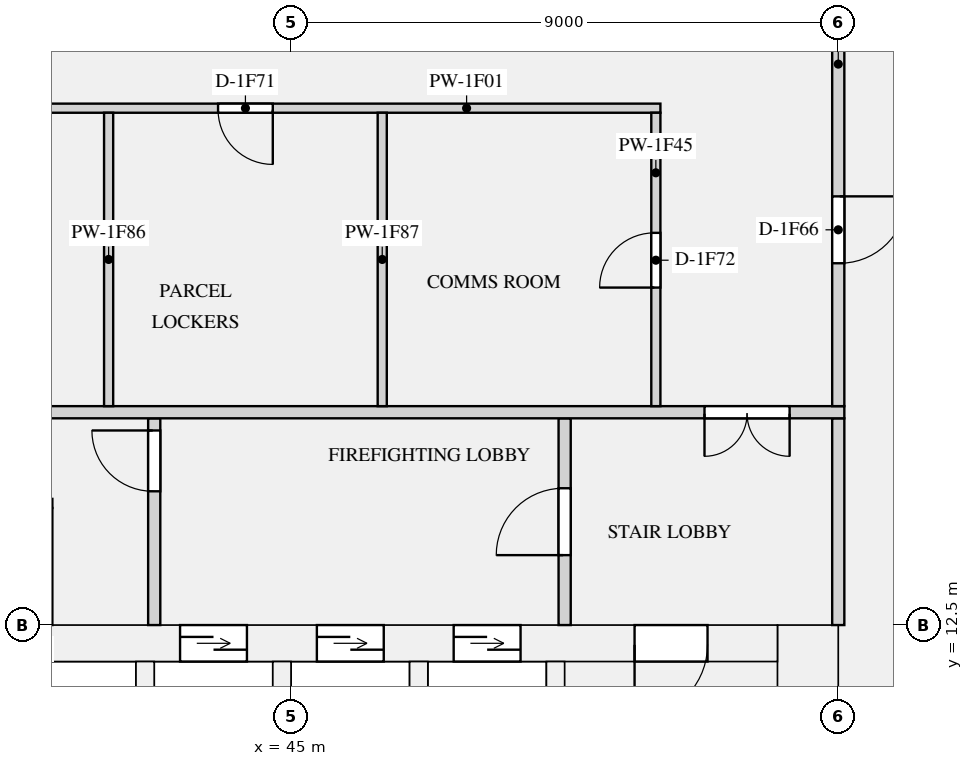
"""IFC4 building model, lengths in metres.
Left out: names, types, materials, properties, quantities, classifications, styles, units other than length and angle.
Written with IfcOpenShell. Run it as: python <this file> out.ifc"""

import sys

from ifc_helpers import new_model, si_unit, direction, frame, frame_2d, origin, place, context, subcontext, project, spatial, rectangle, extrude, element, fill, save


model = new_model("IFC4")
c1 = context("Model", 3, precision=1e-05, world=origin(), true_north=direction((0.0, 1.0)))
c2 = subcontext(c1, "Body", "Model", "MODEL_VIEW")
j1 = project(units=[si_unit("LENGTHUNIT", "METRE"), si_unit("PLANEANGLEUNIT", "RADIAN")], contexts=[c1])
p1 = place(None, origin())
s1 = spatial("IfcSite", under=j1, at=p1, CompositionType="ELEMENT")
p2 = place(p1, origin())
s2 = spatial("IfcBuilding", under=s1, at=p2, CompositionType="ELEMENT")
p3 = place(p2, frame((0.0, 0.0, 60.45)))
s3 = spatial("IfcBuildingStorey", under=s2, at=p3, CompositionType="ELEMENT", Elevation=60.45)
p4 = place(p3, frame((53.5, 0.0, 0.0), z_axis=(0.0, 0.0, 1.0), x_axis=(0.0, 1.0, 0.0)))
e1 = element("IfcWall", 1, at=p4, inside=s3, PredefinedType="SHEAR", context=c2, shape_type="SweptSolid", body=[
    extrude(rectangle(XDim=12.5, YDim=1.0, at=frame_2d((6.25, 0.0))), origin(), (0.0, 0.0, 1.0), 3.15),
])
p5 = place(p3, frame((19.0, 12.2, 0.0), z_axis=(0.0, 0.0, 1.0), x_axis=(1.0, 0.0, 0.0)))
e2 = element("IfcWall", 2, at=p5, inside=s3, PredefinedType="SHEAR", context=c2, shape_type="SweptSolid", body=[
    extrude(rectangle(XDim=34.0, YDim=0.6, at=frame_2d((17.0, 0.0))), origin(), (0.0, 0.0, 1.0), 3.15),
])
p6 = place(p5, frame((4.475, 0.0, 0.0)))
e3 = element("IfcOpeningElement", 3, at=p6, cuts=e2, PredefinedType="OPENING", context=c2, shape_type="SweptSolid", body=[
    extrude(rectangle(XDim=1.2, YDim=2.1, at=frame_2d((0.6, 1.05))), frame((0.0, 0.31, 0.0), z_axis=(0.0, -1.0, 0.0), x_axis=(1.0, 0.0, 0.0)), (0.0, 0.0, 1.0), 0.62),
])
p7 = place(p5, frame((7.325, 0.0, 0.0)))
e4 = element("IfcOpeningElement", 4, at=p7, cuts=e2, PredefinedType="OPENING", context=c2, shape_type="SweptSolid", body=[
    extrude(rectangle(XDim=1.2, YDim=2.1, at=frame_2d((0.6, 1.05))), frame((0.0, 0.31, 0.0), z_axis=(0.0, -1.0, 0.0), x_axis=(1.0, 0.0, 0.0)), (0.0, 0.0, 1.0), 0.62),
])
p8 = place(p5, frame((10.175, 0.0, 0.0)))
e5 = element("IfcOpeningElement", 5, at=p8, cuts=e2, PredefinedType="OPENING", context=c2, shape_type="SweptSolid", body=[
    extrude(rectangle(XDim=1.2, YDim=2.1, at=frame_2d((0.6, 1.05))), frame((0.0, 0.31, 0.0), z_axis=(0.0, -1.0, 0.0), x_axis=(1.0, 0.0, 0.0)), (0.0, 0.0, 1.0), 0.62),
])
p9 = place(p5, frame((13.025, 0.0, 0.0)))
e6 = element("IfcOpeningElement", 6, at=p9, cuts=e2, PredefinedType="OPENING", context=c2, shape_type="SweptSolid", body=[
    extrude(rectangle(XDim=1.2, YDim=2.1, at=frame_2d((0.6, 1.05))), frame((0.0, 0.31, 0.0), z_axis=(0.0, -1.0, 0.0), x_axis=(1.0, 0.0, 0.0)), (0.0, 0.0, 1.0), 0.62),
])
p10 = place(p5, frame((15.875, 0.0, 0.0)))
e7 = element("IfcOpeningElement", 7, at=p10, cuts=e2, PredefinedType="OPENING", context=c2, shape_type="SweptSolid", body=[
    extrude(rectangle(XDim=1.2, YDim=2.1, at=frame_2d((0.6, 1.05))), frame((0.0, 0.31, 0.0), z_axis=(0.0, -1.0, 0.0), x_axis=(1.0, 0.0, 0.0)), (0.0, 0.0, 1.0), 0.62),
])
p11 = place(p5, frame((24.175, 0.0, 0.0)))
e8 = element("IfcOpeningElement", 8, at=p11, cuts=e2, PredefinedType="OPENING", context=c2, shape_type="SweptSolid", body=[
    extrude(rectangle(XDim=1.1, YDim=2.1, at=frame_2d((0.55, 1.05))), frame((0.0, 0.31, 0.0), z_axis=(0.0, -1.0, 0.0), x_axis=(1.0, 0.0, 0.0)), (0.0, 0.0, 1.0), 0.62),
])
p12 = place(p5, frame((26.425, 0.0, 0.0)))
e9 = element("IfcOpeningElement", 9, at=p12, cuts=e2, PredefinedType="OPENING", context=c2, shape_type="SweptSolid", body=[
    extrude(rectangle(XDim=1.1, YDim=2.1, at=frame_2d((0.55, 1.05))), frame((0.0, 0.31, 0.0), z_axis=(0.0, -1.0, 0.0), x_axis=(1.0, 0.0, 0.0)), (0.0, 0.0, 1.0), 0.62),
])
p13 = place(p5, frame((28.675, 0.0, 0.0)))
e10 = element("IfcOpeningElement", 10, at=p13, cuts=e2, PredefinedType="OPENING", context=c2, shape_type="SweptSolid", body=[
    extrude(rectangle(XDim=1.1, YDim=2.1, at=frame_2d((0.55, 1.05))), frame((0.0, 0.31, 0.0), z_axis=(0.0, -1.0, 0.0), x_axis=(1.0, 0.0, 0.0)), (0.0, 0.0, 1.0), 0.62),
])
p14 = place(p5, frame((1.15, 0.0, 0.0)))
e11 = element("IfcOpeningElement", 11, at=p14, cuts=e2, PredefinedType="OPENING", context=c2, shape_type="SweptSolid", body=[
    extrude(rectangle(XDim=1.2, YDim=2.1, at=frame_2d((0.6, 1.05))), frame((0.0, 0.31, 0.0), z_axis=(0.0, -1.0, 0.0), x_axis=(1.0, 0.0, 0.0)), (0.0, 0.0, 1.0), 0.62),
])
p15 = place(p5, frame((31.65, 0.0, 0.0)))
e12 = element("IfcOpeningElement", 12, at=p15, cuts=e2, PredefinedType="OPENING", context=c2, shape_type="SweptSolid", body=[
    extrude(rectangle(XDim=1.2, YDim=2.1, at=frame_2d((0.6, 1.05))), frame((0.0, 0.31, 0.0), z_axis=(0.0, -1.0, 0.0), x_axis=(1.0, 0.0, 0.0)), (0.0, 0.0, 1.0), 0.62),
])
for number, where, z_axis, x_axis in (
    (13, (42.6, 8.25, 0.0), (0.0, 0.0, 1.0), (0.0, 1.0, 0.0)),
    (14, (44.85, 8.25, 0.0), (0.0, 0.0, 1.0), (0.0, 1.0, 0.0)),
    (15, (47.1, 8.25, 0.0), (0.0, 0.0, 1.0), (0.0, 1.0, 0.0)),
    (16, (49.35, 8.25, 0.0), (0.0, 0.0, 1.0), (0.0, 1.0, 0.0)),
):
    element("IfcWall", number, at=place(p3, frame(where, z_axis=z_axis, x_axis=x_axis)), inside=s3, PredefinedType="SHEAR", context=c2, shape_type="SweptSolid", body=[
        extrude(rectangle(XDim=3.65, YDim=0.3, at=frame_2d((1.825, 0.0))), origin(), (0.0, 0.0, 1.0), 3.15),
    ])
p16 = place(p3, frame((42.75, 12.5, 0.0), z_axis=(0.0, 0.0, 1.0), x_axis=(0.0, 1.0, 0.0)))
e17 = element("IfcWall", 17, at=p16, inside=s3, PredefinedType="PARTITIONING", context=c2, shape_type="SweptSolid", body=[
    extrude(rectangle(XDim=3.4, YDim=0.2, at=frame_2d((1.7, 0.0))), origin(), (0.0, 0.0, 1.0), 2.83),
])
p17 = place(p16, frame((2.2, 0.0, 0.0)))
e18 = element("IfcOpeningElement", 18, at=p17, cuts=e17, PredefinedType="OPENING", context=c2, shape_type="SweptSolid", body=[
    extrude(rectangle(XDim=1.0, YDim=2.1, at=frame_2d((0.5, 1.05))), frame((0.0, 0.11, 0.0), z_axis=(0.0, -1.0, 0.0), x_axis=(1.0, 0.0, 0.0)), (0.0, 0.0, 1.0), 0.22),
])
p18 = place(p3, frame((49.5, 12.5, 0.0), z_axis=(0.0, 0.0, 1.0), x_axis=(0.0, 1.0, 0.0)))
e19 = element("IfcWall", 19, at=p18, inside=s3, PredefinedType="PARTITIONING", context=c2, shape_type="SweptSolid", body=[
    extrude(rectangle(XDim=3.4, YDim=0.2, at=frame_2d((1.7, 0.0))), origin(), (0.0, 0.0, 1.0), 2.83),
])
p19 = place(p18, frame((1.15, 0.0, 0.0)))
e20 = element("IfcOpeningElement", 20, at=p19, cuts=e19, PredefinedType="OPENING", context=c2, shape_type="SweptSolid", body=[
    extrude(rectangle(XDim=1.1, YDim=2.1, at=frame_2d((0.55, 1.05))), frame((0.0, 0.11, 0.0), z_axis=(0.0, -1.0, 0.0), x_axis=(1.0, 0.0, 0.0)), (0.0, 0.0, 1.0), 0.22),
])
p20 = place(p3, frame((54.0, 12.5, 0.0), z_axis=(0.0, 0.0, 1.0), x_axis=(0.0, 1.0, 0.0)))
e21 = element("IfcWall", 21, at=p20, inside=s3, PredefinedType="PARTITIONING", context=c2, shape_type="SweptSolid", body=[
    extrude(rectangle(XDim=3.4, YDim=0.2, at=frame_2d((1.7, 0.0))), origin(), (0.0, 0.0, 1.0), 2.83),
])
p21 = place(p3, frame((20.925, 21.0, 0.0), z_axis=(0.0, 0.0, 1.0), x_axis=(1.0, 0.0, 0.0)))
e22 = element("IfcWall", 22, at=p21, inside=s3, PredefinedType="PARTITIONING", context=c2, shape_type="SweptSolid", body=[
    extrude(rectangle(XDim=30.15, YDim=0.15, at=frame_2d((15.075, 0.0))), origin(), (0.0, 0.0, 1.0), 2.83),
])
p22 = place(p21, frame((2.625, 0.0, 0.0)))
e23 = element("IfcOpeningElement", 23, at=p22, cuts=e22, PredefinedType="OPENING", context=c2, shape_type="SweptSolid", body=[
    extrude(rectangle(XDim=0.9, YDim=2.1, at=frame_2d((0.45, 1.05))), frame((0.0, 0.085, 0.0), z_axis=(0.0, -1.0, 0.0), x_axis=(1.0, 0.0, 0.0)), (0.0, 0.0, 1.0), 0.17),
])
p23 = place(p21, frame((7.875, 0.0, 0.0)))
e24 = element("IfcOpeningElement", 24, at=p23, cuts=e22, PredefinedType="OPENING", context=c2, shape_type="SweptSolid", body=[
    extrude(rectangle(XDim=0.9, YDim=2.1, at=frame_2d((0.45, 1.05))), frame((0.0, 0.085, 0.0), z_axis=(0.0, -1.0, 0.0), x_axis=(1.0, 0.0, 0.0)), (0.0, 0.0, 1.0), 0.17),
])
p24 = place(p21, frame((11.625, 0.0, 0.0)))
e25 = element("IfcOpeningElement", 25, at=p24, cuts=e22, PredefinedType="OPENING", context=c2, shape_type="SweptSolid", body=[
    extrude(rectangle(XDim=0.9, YDim=2.1, at=frame_2d((0.45, 1.05))), frame((0.0, 0.085, 0.0), z_axis=(0.0, -1.0, 0.0), x_axis=(1.0, 0.0, 0.0)), (0.0, 0.0, 1.0), 0.17),
])
p25 = place(p21, frame((16.875, 0.0, 0.0)))
e26 = element("IfcOpeningElement", 26, at=p25, cuts=e22, PredefinedType="OPENING", context=c2, shape_type="SweptSolid", body=[
    extrude(rectangle(XDim=0.9, YDim=2.1, at=frame_2d((0.45, 1.05))), frame((0.0, 0.085, 0.0), z_axis=(0.0, -1.0, 0.0), x_axis=(1.0, 0.0, 0.0)), (0.0, 0.0, 1.0), 0.17),
])
p26 = place(p21, frame((22.875, 0.0, 0.0)))
e27 = element("IfcOpeningElement", 27, at=p26, cuts=e22, PredefinedType="OPENING", context=c2, shape_type="SweptSolid", body=[
    extrude(rectangle(XDim=0.9, YDim=2.1, at=frame_2d((0.45, 1.05))), frame((0.0, 0.085, 0.0), z_axis=(0.0, -1.0, 0.0), x_axis=(1.0, 0.0, 0.0)), (0.0, 0.0, 1.0), 0.17),
])
p27 = place(p3, frame((17.9, 16.0, 0.0), z_axis=(0.0, 0.0, 1.0), x_axis=(1.0, 0.0, 0.0)))
e28 = element("IfcWall", 28, at=p27, inside=s3, PredefinedType="PARTITIONING", context=c2, shape_type="SweptSolid", body=[
    extrude(rectangle(XDim=36.2, YDim=0.2, at=frame_2d((18.1, 0.0))), origin(), (0.0, 0.0, 1.0), 2.83),
])
p28 = place(p27, frame((0.9, 0.0, 0.0)))
e29 = element("IfcOpeningElement", 29, at=p28, cuts=e28, PredefinedType="OPENING", context=c2, shape_type="SweptSolid", body=[
    extrude(rectangle(XDim=1.4, YDim=2.1, at=frame_2d((0.7, 1.05))), frame((0.0, 0.11, 0.0), z_axis=(0.0, -1.0, 0.0), x_axis=(1.0, 0.0, 0.0)), (0.0, 0.0, 1.0), 0.22),
])
p29 = place(p27, frame((33.9, 0.0, 0.0)))
e30 = element("IfcOpeningElement", 30, at=p29, cuts=e28, PredefinedType="OPENING", context=c2, shape_type="SweptSolid", body=[
    extrude(rectangle(XDim=1.4, YDim=2.1, at=frame_2d((0.7, 1.05))), frame((0.0, 0.11, 0.0), z_axis=(0.0, -1.0, 0.0), x_axis=(1.0, 0.0, 0.0)), (0.0, 0.0, 1.0), 0.22),
])
p30 = place(p3, frame((54.0, 16.1, 0.0), z_axis=(0.0, 0.0, 1.0), x_axis=(0.0, 1.0, 0.0)))
e31 = element("IfcWall", 31, at=p30, inside=s3, PredefinedType="PARTITIONING", context=c2, shape_type="SweptSolid", body=[
    extrude(rectangle(XDim=7.8, YDim=0.2, at=frame_2d((3.9, 0.0))), origin(), (0.0, 0.0, 1.0), 2.83),
])
p31 = place(p30, frame((2.35, 0.0, 0.0)))
e32 = element("IfcOpeningElement", 32, at=p31, cuts=e31, PredefinedType="OPENING", context=c2, shape_type="SweptSolid", body=[
    extrude(rectangle(XDim=1.1, YDim=2.1, at=frame_2d((0.55, 1.05))), frame((0.0, 0.11, 0.0), z_axis=(0.0, -1.0, 0.0), x_axis=(1.0, 0.0, 0.0)), (0.0, 0.0, 1.0), 0.22),
])
p32 = place(p3, frame((51.0, 16.1, 0.0), z_axis=(0.0, 0.0, 1.0), x_axis=(0.0, 1.0, 0.0)))
e33 = element("IfcWall", 33, at=p32, inside=s3, PredefinedType="PARTITIONING", context=c2, shape_type="SweptSolid", body=[
    extrude(rectangle(XDim=4.825, YDim=0.15, at=frame_2d((2.413, 0.0))), origin(), (0.0, 0.0, 1.0), 2.83),
])
p33 = place(p32, frame((1.95, 0.0, 0.0)))
e34 = element("IfcOpeningElement", 34, at=p33, cuts=e33, PredefinedType="OPENING", context=c2, shape_type="SweptSolid", body=[
    extrude(rectangle(XDim=0.9, YDim=2.1, at=frame_2d((0.45, 1.05))), frame((0.0, 0.085, 0.0), z_axis=(0.0, -1.0, 0.0), x_axis=(1.0, 0.0, 0.0)), (0.0, 0.0, 1.0), 0.17),
])
for number, where, z_axis, x_axis in (
    (35, (42.0, 16.1, 0.0), (0.0, 0.0, 1.0), (0.0, 1.0, 0.0)),
    (36, (46.5, 16.1, 0.0), (0.0, 0.0, 1.0), (0.0, 1.0, 0.0)),
):
    element("IfcWall", number, at=place(p3, frame(where, z_axis=z_axis, x_axis=x_axis)), inside=s3, PredefinedType="PARTITIONING", context=c2, shape_type="SweptSolid", body=[
        extrude(rectangle(XDim=4.825, YDim=0.15, at=frame_2d((2.413, 0.0))), origin(), (0.0, 0.0, 1.0), 2.83),
    ])
p34 = place(p11, origin())
e37 = element("IfcDoor", 37, at=p34, inside=s3, OperationType="DOUBLE_DOOR_SLIDING", PredefinedType="DOOR", context=c2, shape_type="SweptSolid", body=[
    extrude(rectangle(XDim=1.1, YDim=2.1, at=frame_2d((0.55, 1.05))), frame((0.0, 0.025, 0.0), z_axis=(0.0, -1.0, 0.0), x_axis=(1.0, 0.0, 0.0)), (0.0, 0.0, 1.0), 0.05),
])
fill(e8, e37)
p35 = place(p12, origin())
e38 = element("IfcDoor", 38, at=p35, inside=s3, OperationType="DOUBLE_DOOR_SLIDING", PredefinedType="DOOR", context=c2, shape_type="SweptSolid", body=[
    extrude(rectangle(XDim=1.1, YDim=2.1, at=frame_2d((0.55, 1.05))), frame((0.0, 0.025, 0.0), z_axis=(0.0, -1.0, 0.0), x_axis=(1.0, 0.0, 0.0)), (0.0, 0.0, 1.0), 0.05),
])
fill(e9, e38)
p36 = place(p13, origin())
e39 = element("IfcDoor", 39, at=p36, inside=s3, OperationType="DOUBLE_DOOR_SLIDING", PredefinedType="DOOR", context=c2, shape_type="SweptSolid", body=[
    extrude(rectangle(XDim=1.1, YDim=2.1, at=frame_2d((0.55, 1.05))), frame((0.0, 0.025, 0.0), z_axis=(0.0, -1.0, 0.0), x_axis=(1.0, 0.0, 0.0)), (0.0, 0.0, 1.0), 0.05),
])
fill(e10, e39)
p37 = place(p15, frame((1.2, 0.0, 0.0), z_axis=(0.0, 0.0, 1.0), x_axis=(-1.0, 0.0, 0.0)))
e40 = element("IfcDoor", 40, at=p37, inside=s3, OperationType="SINGLE_SWING_RIGHT", PredefinedType="DOOR", context=c2, shape_type="SweptSolid", body=[
    extrude(rectangle(XDim=1.2, YDim=2.1, at=frame_2d((0.6, 1.05))), frame((0.0, 0.025, 0.0), z_axis=(0.0, -1.0, 0.0), x_axis=(1.0, 0.0, 0.0)), (0.0, 0.0, 1.0), 0.05),
])
fill(e12, e40)
p38 = place(p17, origin())
e41 = element("IfcDoor", 41, at=p38, inside=s3, OperationType="SINGLE_SWING_RIGHT", PredefinedType="DOOR", context=c2, shape_type="SweptSolid", body=[
    extrude(rectangle(XDim=1.0, YDim=2.1, at=frame_2d((0.5, 1.05))), frame((0.0, 0.025, 0.0), z_axis=(0.0, -1.0, 0.0), x_axis=(1.0, 0.0, 0.0)), (0.0, 0.0, 1.0), 0.05),
])
fill(e18, e41)
p39 = place(p19, origin())
e42 = element("IfcDoor", 42, at=p39, inside=s3, OperationType="SINGLE_SWING_LEFT", PredefinedType="DOOR", context=c2, shape_type="SweptSolid", body=[
    extrude(rectangle(XDim=1.1, YDim=2.1, at=frame_2d((0.55, 1.05))), frame((0.0, 0.025, 0.0), z_axis=(0.0, -1.0, 0.0), x_axis=(1.0, 0.0, 0.0)), (0.0, 0.0, 1.0), 0.05),
])
fill(e20, e42)
p40 = place(p29, frame((1.4, 0.0, 0.0), z_axis=(0.0, 0.0, 1.0), x_axis=(-1.0, 0.0, 0.0)))
e43 = element("IfcDoor", 43, at=p40, inside=s3, OperationType="DOUBLE_DOOR_SINGLE_SWING", PredefinedType="DOOR", context=c2, shape_type="SweptSolid", body=[
    extrude(rectangle(XDim=1.4, YDim=2.1, at=frame_2d((0.7, 1.05))), frame((0.0, 0.025, 0.0), z_axis=(0.0, -1.0, 0.0), x_axis=(1.0, 0.0, 0.0)), (0.0, 0.0, 1.0), 0.05),
])
fill(e30, e43)
p41 = place(p31, frame((1.1, 0.0, 0.0), z_axis=(0.0, 0.0, 1.0), x_axis=(-1.0, 0.0, 0.0)))
e44 = element("IfcDoor", 44, at=p41, inside=s3, OperationType="SINGLE_SWING_LEFT", PredefinedType="DOOR", context=c2, shape_type="SweptSolid", body=[
    extrude(rectangle(XDim=1.1, YDim=2.1, at=frame_2d((0.55, 1.05))), frame((0.0, 0.025, 0.0), z_axis=(0.0, -1.0, 0.0), x_axis=(1.0, 0.0, 0.0)), (0.0, 0.0, 1.0), 0.05),
])
fill(e32, e44)
p42 = place(p26, frame((0.9, 0.0, 0.0), z_axis=(0.0, 0.0, 1.0), x_axis=(-1.0, 0.0, 0.0)))
e45 = element("IfcDoor", 45, at=p42, inside=s3, OperationType="SINGLE_SWING_LEFT", PredefinedType="DOOR", context=c2, shape_type="SweptSolid", body=[
    extrude(rectangle(XDim=0.9, YDim=2.1, at=frame_2d((0.45, 1.05))), frame((0.0, 0.025, 0.0), z_axis=(0.0, -1.0, 0.0), x_axis=(1.0, 0.0, 0.0)), (0.0, 0.0, 1.0), 0.05),
])
fill(e27, e45)
p43 = place(p33, origin())
e46 = element("IfcDoor", 46, at=p43, inside=s3, OperationType="SINGLE_SWING_LEFT", PredefinedType="DOOR", context=c2, shape_type="SweptSolid", body=[
    extrude(rectangle(XDim=0.9, YDim=2.1, at=frame_2d((0.45, 1.05))), frame((0.0, 0.025, 0.0), z_axis=(0.0, -1.0, 0.0), x_axis=(1.0, 0.0, 0.0)), (0.0, 0.0, 1.0), 0.05),
])
fill(e34, e46)
save(model, sys.argv[1])
